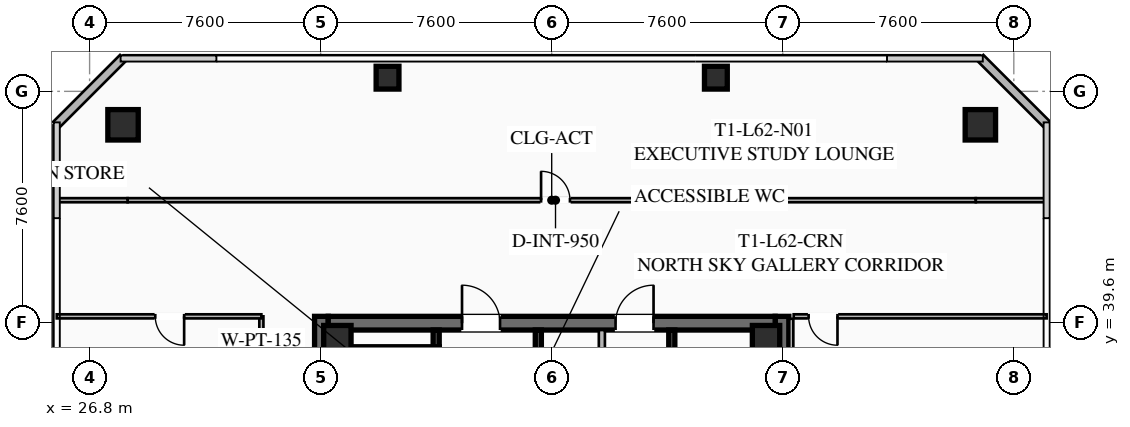
"""IFC4 building model, lengths in metres.
Left out: names, types, materials, properties, quantities, classifications, styles, units other than length and angle.
Written with IfcOpenShell. Run it as: python <this file> out.ifc"""

import sys

from ifc_helpers import new_model, si_unit, direction, frame, frame_2d, origin, origin_2d, place, context, subcontext, project, spatial, rectangle, hollow_rectangle, extrude, element, fill, save


model = new_model("IFC4")
c1 = context("Model", 3, precision=1e-05, world=origin(), true_north=direction((0.0, 1.0)))
c2 = subcontext(c1, "Body", "Model", "MODEL_VIEW")
j1 = project(units=[si_unit("LENGTHUNIT", "METRE"), si_unit("PLANEANGLEUNIT", "RADIAN")], contexts=[c1])
p1 = place(None, origin())
s1 = spatial("IfcSite", under=j1, at=p1, CompositionType="ELEMENT")
p2 = place(p1, origin())
s2 = spatial("IfcBuilding", under=s1, at=p2, CompositionType="ELEMENT")
p3 = place(p2, frame((0.0, 0.0, 229.05)))
s3 = spatial("IfcBuildingStorey", under=s2, at=p3, CompositionType="ELEMENT", Elevation=229.05)
for number, where, z_axis, x_axis in (
    (1, (34.425, 24.2, 0.0), (0.0, 0.0, 1.0), (0.0, 1.0, 0.0)),
    (2, (49.575, 39.8, 0.0), (0.0, 0.0, 1.0), (0.0, -1.0, 0.0)),
):
    element("IfcWall", number, at=place(p3, frame(where, z_axis=z_axis, x_axis=x_axis)), inside=s3, PredefinedType="SHEAR", context=c2, shape_type="SweptSolid", body=[
        extrude(rectangle(XDim=15.6, YDim=0.45, at=frame_2d((7.8, 0.0))), origin(), (0.0, 0.0, 1.0), 3.55),
    ])
p4 = place(p3, frame((34.65, 39.575, 0.0), z_axis=(0.0, 0.0, 1.0), x_axis=(1.0, 0.0, 0.0)))
e3 = element("IfcWall", 3, at=p4, inside=s3, PredefinedType="SHEAR", context=c2, shape_type="SweptSolid", body=[
    extrude(rectangle(XDim=14.7, YDim=0.45, at=frame_2d((7.35, 0.0))), origin(), (0.0, 0.0, 1.0), 3.55),
])
p5 = place(p4, frame((4.4, 0.0, 0.0)))
e4 = element("IfcOpeningElement", 4, at=p5, cuts=e3, PredefinedType="OPENING", context=c2, shape_type="SweptSolid", body=[
    extrude(rectangle(XDim=1.25, YDim=2.25, at=frame_2d((0.625, 1.125))), frame((0.0, 0.235, 0.0), z_axis=(0.0, -1.0, 0.0), x_axis=(1.0, 0.0, 0.0)), (0.0, 0.0, 1.0), 0.47),
])
p6 = place(p4, frame((9.45, 0.0, 0.0)))
e5 = element("IfcOpeningElement", 5, at=p6, cuts=e3, PredefinedType="OPENING", context=c2, shape_type="SweptSolid", body=[
    extrude(rectangle(XDim=1.25, YDim=2.25, at=frame_2d((0.625, 1.125))), frame((0.0, 0.235, 0.0), z_axis=(0.0, -1.0, 0.0), x_axis=(1.0, 0.0, 0.0)), (0.0, 0.0, 1.0), 0.47),
])
for number, where, z_axis, x_axis in (
    (6, (49.05, 39.05, 0.0), (0.0, 0.0, 1.0), (1.0, 0.0, 0.0)),
    (7, (34.95, 39.05, 0.0), (0.0, 0.0, 1.0), (1.0, 0.0, 0.0)),
):
    element("IfcColumn", number, at=place(p3, frame(where, z_axis=z_axis, x_axis=x_axis)), inside=s3, PredefinedType="COLUMN", context=c2, shape_type="SweptSolid", body=[
        extrude(hollow_rectangle(XDim=0.9, YDim=0.9, WallThickness=0.04, at=origin_2d()), origin(), (0.0, 0.0, 1.0), 3.37),
    ])
for number, where, z_axis, x_axis in (
    (8, (56.1, 46.1, 0.0), (0.0, 0.0, 1.0), (1.0, 0.0, 0.0)),
    (9, (27.9, 46.1, 0.0), (0.0, 0.0, 1.0), (1.0, 0.0, 0.0)),
):
    element("IfcColumn", number, at=place(p3, frame(where, z_axis=z_axis, x_axis=x_axis)), inside=s3, PredefinedType="COLUMN", context=c2, shape_type="SweptSolid", body=[
        extrude(hollow_rectangle(XDim=1.0, YDim=1.0, WallThickness=0.04, at=origin_2d()), origin(), (0.0, 0.0, 1.0), 3.37),
    ])
for number, where, z_axis, x_axis in (
    (10, (47.4, 47.65, 0.0), (0.0, 0.0, 1.0), (1.0, 0.0, 0.0)),
    (11, (36.6, 47.65, 0.0), (0.0, 0.0, 1.0), (1.0, 0.0, 0.0)),
):
    element("IfcColumn", number, at=place(p3, frame(where, z_axis=z_axis, x_axis=x_axis)), inside=s3, PredefinedType="COLUMN", context=c2, shape_type="SweptSolid", body=[
        extrude(hollow_rectangle(XDim=0.75, YDim=0.75, WallThickness=0.032, at=origin_2d()), origin(), (0.0, 0.0, 1.0), 3.37),
    ])
for number, where, z_axis, x_axis in (
    (12, (25.7, 46.1, 0.0), (0.0, 0.0, 1.0), (0.707, 0.707, 0.0)),
    (13, (56.1, 48.3, 0.0), (0.0, 0.0, 1.0), (0.707, -0.707, 0.0)),
):
    element("IfcWall", number, at=place(p3, frame(where, z_axis=z_axis, x_axis=x_axis)), inside=s3, PredefinedType="SOLIDWALL", context=c2, shape_type="SweptSolid", body=[
        extrude(rectangle(XDim=3.111, YDim=0.28, at=frame_2d((1.556, 0.0))), origin(), (0.0, 0.0, 1.0), 3.37),
    ])
p7 = place(p3, frame((38.2, 31.2, 0.0), z_axis=(0.0, 0.0, 1.0), x_axis=(0.0, 1.0, 0.0)))
e14 = element("IfcWall", 14, at=p7, inside=s3, PredefinedType="SHEAR", context=c2, shape_type="SweptSolid", body=[
    extrude(rectangle(XDim=8.15, YDim=0.2, at=frame_2d((4.075, 0.0))), origin(), (0.0, 0.0, 1.0), 3.37),
])
p8 = place(p7, frame((0.45, 0.0, 0.0)))
e15 = element("IfcOpeningElement", 15, at=p8, cuts=e14, PredefinedType="OPENING", context=c2, shape_type="SweptSolid", body=[
    extrude(rectangle(XDim=1.15, YDim=2.2, at=frame_2d((0.575, 1.1))), frame((0.0, 0.11, 0.0), z_axis=(0.0, -1.0, 0.0), x_axis=(1.0, 0.0, 0.0)), (0.0, 0.0, 1.0), 0.22),
])
p9 = place(p3, frame((41.56, 24.65, 0.0), z_axis=(0.0, 0.0, 1.0), x_axis=(0.0, 1.0, 0.0)))
e16 = element("IfcWall", 16, at=p9, inside=s3, PredefinedType="SHEAR", context=c2, shape_type="SweptSolid", body=[
    extrude(rectangle(XDim=14.7, YDim=0.2, at=frame_2d((7.35, 0.0))), origin(), (0.0, 0.0, 1.0), 3.37),
])
p10 = place(p3, frame((45.95, 39.35, 0.0), z_axis=(0.0, 0.0, 1.0), x_axis=(0.0, -1.0, 0.0)))
e17 = element("IfcWall", 17, at=p10, inside=s3, PredefinedType="SHEAR", context=c2, shape_type="SweptSolid", body=[
    extrude(rectangle(XDim=6.55, YDim=0.2, at=frame_2d((3.275, 0.0))), origin(), (0.0, 0.0, 1.0), 3.37),
])
p11 = place(p10, frame((5.075, 0.0, 0.0)))
e18 = element("IfcOpeningElement", 18, at=p11, cuts=e17, PredefinedType="OPENING", context=c2, shape_type="SweptSolid", body=[
    extrude(rectangle(XDim=1.1, YDim=2.2, at=frame_2d((0.55, 1.1))), frame((0.0, 0.11, 0.0), z_axis=(0.0, -1.0, 0.0), x_axis=(1.0, 0.0, 0.0)), (0.0, 0.0, 1.0), 0.22),
])
p12 = place(p10, frame((3.025, 0.0, 0.0)))
e19 = element("IfcOpeningElement", 19, at=p12, cuts=e17, PredefinedType="OPENING", context=c2, shape_type="SweptSolid", body=[
    extrude(rectangle(XDim=1.1, YDim=2.2, at=frame_2d((0.55, 1.1))), frame((0.0, 0.11, 0.0), z_axis=(0.0, -1.0, 0.0), x_axis=(1.0, 0.0, 0.0)), (0.0, 0.0, 1.0), 0.22),
])
p13 = place(p10, frame((1.025, 0.0, 0.0)))
e20 = element("IfcOpeningElement", 20, at=p13, cuts=e17, PredefinedType="OPENING", context=c2, shape_type="SweptSolid", body=[
    extrude(rectangle(XDim=1.1, YDim=2.2, at=frame_2d((0.55, 1.1))), frame((0.0, 0.11, 0.0), z_axis=(0.0, -1.0, 0.0), x_axis=(1.0, 0.0, 0.0)), (0.0, 0.0, 1.0), 0.22),
])
p14 = place(p3, frame((43.65, 32.35, 0.0), z_axis=(0.0, 0.0, 1.0), x_axis=(0.0, 1.0, 0.0)))
e21 = element("IfcWall", 21, at=p14, inside=s3, PredefinedType="SOLIDWALL", context=c2, shape_type="SweptSolid", body=[
    extrude(rectangle(XDim=7.0, YDim=0.2, at=frame_2d((3.5, 0.0))), origin(), (0.0, 0.0, 1.0), 2.513),
])
p15 = place(p14, frame((0.85, 0.0, 0.0)))
e22 = element("IfcOpeningElement", 22, at=p15, cuts=e21, PredefinedType="OPENING", context=c2, shape_type="SweptSolid", body=[
    extrude(rectangle(XDim=0.95, YDim=2.05, at=frame_2d((0.475, 1.025))), frame((0.0, 0.11, 0.0), z_axis=(0.0, -1.0, 0.0), x_axis=(1.0, 0.0, 0.0)), (0.0, 0.0, 1.0), 0.22),
])
p16 = place(p14, frame((4.85, 0.0, 0.0)))
e23 = element("IfcOpeningElement", 23, at=p16, cuts=e21, PredefinedType="OPENING", context=c2, shape_type="SweptSolid", body=[
    extrude(rectangle(XDim=0.95, YDim=2.05, at=frame_2d((0.475, 1.025))), frame((0.0, 0.11, 0.0), z_axis=(0.0, -1.0, 0.0), x_axis=(1.0, 0.0, 0.0)), (0.0, 0.0, 1.0), 0.22),
])
p17 = place(p3, frame((32.45, 35.4, 0.0), z_axis=(0.0, 0.0, 1.0), x_axis=(0.0, 1.0, 0.0)))
e24 = element("IfcWall", 24, at=p17, inside=s3, PredefinedType="PARTITIONING", context=c2, shape_type="SweptSolid", body=[
    extrude(rectangle(XDim=4.4, YDim=0.135, at=frame_2d((2.2, 0.0))), origin(), (0.0, 0.0, 1.0), 2.513),
])
p18 = place(p3, frame((28.05, 43.62, 0.0), z_axis=(0.0, 0.0, 1.0), x_axis=(1.0, 0.0, 0.0)))
e25 = element("IfcWall", 25, at=p18, inside=s3, PredefinedType="PARTITIONING", context=c2, shape_type="SweptSolid", body=[
    extrude(rectangle(XDim=27.9, YDim=0.135, at=frame_2d((13.95, 0.0))), origin(), (0.0, 0.0, 1.0), 2.513),
])
p19 = place(p18, frame((13.601, 0.0, 0.0)))
e26 = element("IfcOpeningElement", 26, at=p19, cuts=e25, PredefinedType="OPENING", context=c2, shape_type="SweptSolid", body=[
    extrude(rectangle(XDim=0.95, YDim=2.05, at=frame_2d((0.475, 1.025))), frame((0.0, 0.077, 0.0), z_axis=(0.0, -1.0, 0.0), x_axis=(1.0, 0.0, 0.0)), (0.0, 0.0, 1.0), 0.155),
])
for number, where, z_axis, x_axis in (
    (27, (25.72, 43.62, 0.0), (0.0, 0.0, 1.0), (1.0, 0.0, 0.0)),
    (28, (55.95, 43.62, 0.0), (0.0, 0.0, 1.0), (1.0, 0.0, 0.0)),
):
    element("IfcWall", number, at=place(p3, frame(where, z_axis=z_axis, x_axis=x_axis)), inside=s3, PredefinedType="PARTITIONING", context=c2, shape_type="SweptSolid", body=[
        extrude(rectangle(XDim=2.33, YDim=0.135, at=frame_2d((1.165, 0.0))), origin(), (0.0, 0.0, 1.0), 2.513),
    ])
p20 = place(p3, frame((49.88, 39.72, 0.0), z_axis=(0.0, 0.0, 1.0), x_axis=(0.0, -1.0, 0.0)))
e29 = element("IfcWall", 29, at=p20, inside=s3, PredefinedType="PARTITIONING", context=c2, shape_type="SweptSolid", body=[
    extrude(rectangle(XDim=15.44, YDim=0.135, at=frame_2d((7.72, 0.0))), origin(), (0.0, 0.0, 1.0), 2.513),
])
p21 = place(p3, frame((58.28, 39.8, 0.0), z_axis=(0.0, 0.0, 1.0), x_axis=(-1.0, 0.0, 0.0)))
e30 = element("IfcWall", 30, at=p21, inside=s3, PredefinedType="PARTITIONING", context=c2, shape_type="SweptSolid", body=[
    extrude(rectangle(XDim=8.32, YDim=0.135, at=frame_2d((4.16, 0.0))), origin(), (0.0, 0.0, 1.0), 2.513),
])
p22 = place(p21, frame((6.88, 0.0, 0.0)))
e31 = element("IfcOpeningElement", 31, at=p22, cuts=e30, PredefinedType="OPENING", context=c2, shape_type="SweptSolid", body=[
    extrude(rectangle(XDim=0.95, YDim=2.05, at=frame_2d((0.475, 1.025))), frame((0.0, 0.077, 0.0), z_axis=(0.0, -1.0, 0.0), x_axis=(1.0, 0.0, 0.0)), (0.0, 0.0, 1.0), 0.155),
])
p23 = place(p3, frame((32.45, 39.8, 0.0), z_axis=(0.0, 0.0, 1.0), x_axis=(-1.0, 0.0, 0.0)))
e32 = element("IfcWall", 32, at=p23, inside=s3, PredefinedType="PARTITIONING", context=c2, shape_type="SweptSolid", body=[
    extrude(rectangle(XDim=6.73, YDim=0.135, at=frame_2d((3.365, 0.0))), origin(), (0.0, 0.0, 1.0), 2.513),
])
p24 = place(p23, frame((2.54, 0.0, 0.0)))
e33 = element("IfcOpeningElement", 33, at=p24, cuts=e32, PredefinedType="OPENING", context=c2, shape_type="SweptSolid", body=[
    extrude(rectangle(XDim=0.95, YDim=2.05, at=frame_2d((0.475, 1.025))), frame((0.0, 0.077, 0.0), z_axis=(0.0, -1.0, 0.0), x_axis=(1.0, 0.0, 0.0)), (0.0, 0.0, 1.0), 0.155),
])
p25 = place(p5, origin())
e34 = element("IfcDoor", 34, at=p25, inside=s3, OperationType="SINGLE_SWING_LEFT", PredefinedType="DOOR", context=c2, shape_type="SweptSolid", body=[
    extrude(rectangle(XDim=1.25, YDim=2.25, at=frame_2d((0.625, 1.125))), frame((0.0, 0.025, 0.0), z_axis=(0.0, -1.0, 0.0), x_axis=(1.0, 0.0, 0.0)), (0.0, 0.0, 1.0), 0.05),
])
fill(e4, e34)
p26 = place(p6, origin())
e35 = element("IfcDoor", 35, at=p26, inside=s3, OperationType="SINGLE_SWING_RIGHT", PredefinedType="DOOR", context=c2, shape_type="SweptSolid", body=[
    extrude(rectangle(XDim=1.25, YDim=2.25, at=frame_2d((0.625, 1.125))), frame((0.0, 0.025, 0.0), z_axis=(0.0, -1.0, 0.0), x_axis=(1.0, 0.0, 0.0)), (0.0, 0.0, 1.0), 0.05),
])
fill(e5, e35)
p27 = place(p19, origin())
e36 = element("IfcDoor", 36, at=p27, inside=s3, OperationType="SINGLE_SWING_LEFT", PredefinedType="DOOR", context=c2, shape_type="SweptSolid", body=[
    extrude(rectangle(XDim=0.95, YDim=2.05, at=frame_2d((0.475, 1.025))), frame((0.0, 0.025, 0.0), z_axis=(0.0, -1.0, 0.0), x_axis=(1.0, 0.0, 0.0)), (0.0, 0.0, 1.0), 0.05),
])
fill(e26, e36)
p28 = place(p22, origin())
e37 = element("IfcDoor", 37, at=p28, inside=s3, OperationType="SINGLE_SWING_LEFT", PredefinedType="DOOR", context=c2, shape_type="SweptSolid", body=[
    extrude(rectangle(XDim=0.95, YDim=2.05, at=frame_2d((0.475, 1.025))), frame((0.0, 0.025, 0.0), z_axis=(0.0, -1.0, 0.0), x_axis=(1.0, 0.0, 0.0)), (0.0, 0.0, 1.0), 0.05),
])
fill(e31, e37)
p29 = place(p24, origin())
e38 = element("IfcDoor", 38, at=p29, inside=s3, OperationType="SINGLE_SWING_LEFT", PredefinedType="DOOR", context=c2, shape_type="SweptSolid", body=[
    extrude(rectangle(XDim=0.95, YDim=2.05, at=frame_2d((0.475, 1.025))), frame((0.0, 0.025, 0.0), z_axis=(0.0, -1.0, 0.0), x_axis=(1.0, 0.0, 0.0)), (0.0, 0.0, 1.0), 0.05),
])
fill(e33, e38)
save(model, sys.argv[1])
